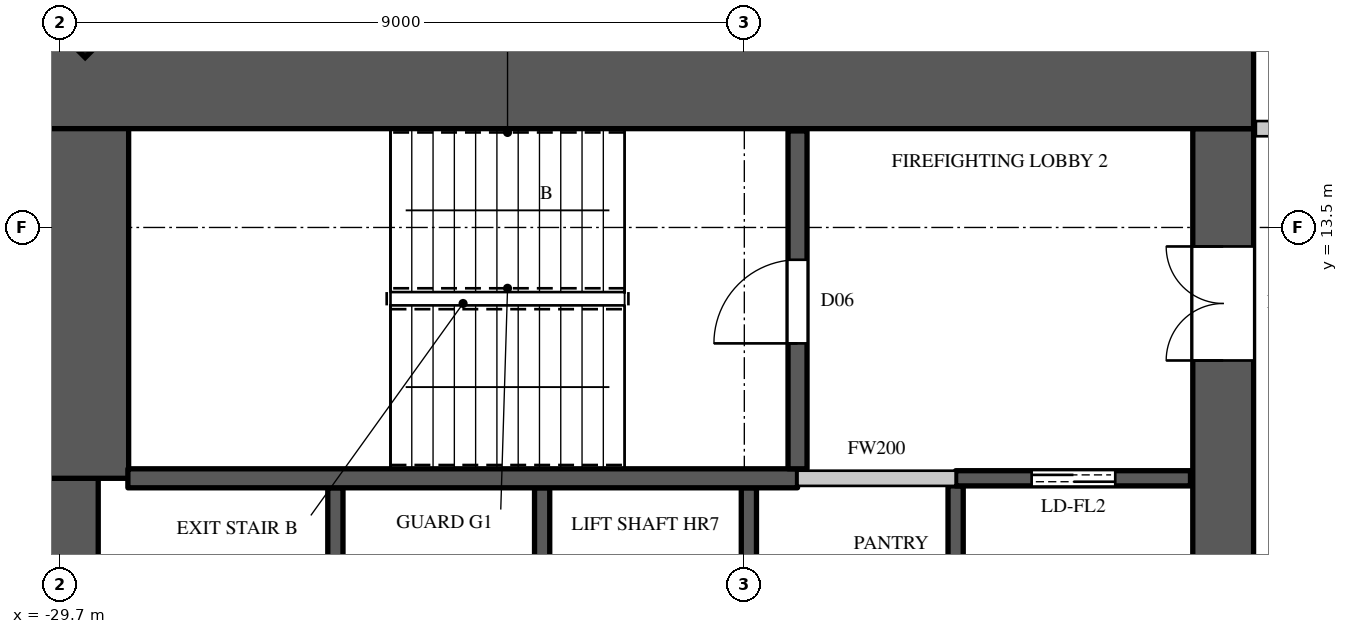
"""IFC4 building model, lengths in metres.
Left out: names, types, materials, properties, quantities, classifications, styles, units other than length and angle.
Written with IfcOpenShell. Run it as: python <this file> out.ifc"""

import sys

from ifc_helpers import new_model, si_unit, direction, frame, frame_2d, origin, origin_2d, place, context, subcontext, project, spatial, rectangle, extrude, element, fill, save


model = new_model("IFC4")
c1 = context("Model", 3, precision=1e-05, world=origin(), true_north=direction((0.0, 1.0)))
c2 = subcontext(c1, "Body", "Model", "MODEL_VIEW")
j1 = project(units=[si_unit("LENGTHUNIT", "METRE"), si_unit("PLANEANGLEUNIT", "RADIAN")], contexts=[c1])
p1 = place(None, origin())
s1 = spatial("IfcSite", under=j1, at=p1, CompositionType="ELEMENT")
p2 = place(p1, origin())
s2 = spatial("IfcBuilding", under=s1, at=p2, CompositionType="ELEMENT")
p3 = place(p2, frame((0.0, 0.0, 205.6)))
s3 = spatial("IfcBuildingStorey", under=s2, at=p3, CompositionType="ELEMENT", Elevation=205.6)
p4 = place(p3, frame((-29.443, 16.443, 0.0), z_axis=(0.0, 0.0, 1.0), x_axis=(-0.707106781187, -0.707106781187, 0.0)))
e1 = element("IfcColumn", 1, at=p4, inside=s3, PredefinedType="COLUMN", context=c2, shape_type="SweptSolid", body=[
    extrude(rectangle(XDim=0.9, YDim=1.1, at=origin_2d()), origin(), (0.0, 0.0, 1.0), 4.1),
])
p5 = place(p3, frame((-30.0, 15.4, 0.0), z_axis=(0.0, 0.0, 1.0), x_axis=(1.0, 0.0, 0.0)))
e2 = element("IfcWall", 2, at=p5, inside=s3, PredefinedType="SHEAR", context=c2, shape_type="SweptSolid", body=[
    extrude(rectangle(XDim=16.0, YDim=1.2, at=frame_2d((8.0, 0.0))), origin(), (0.0, 0.0, 1.0), 4.1),
])
p6 = place(p3, frame((-14.4, -14.8, 0.0), z_axis=(0.0, 0.0, 1.0), x_axis=(0.0, 1.0, 0.0)))
e3 = element("IfcWall", 3, at=p6, inside=s3, PredefinedType="SHEAR", context=c2, shape_type="SweptSolid", body=[
    extrude(rectangle(XDim=29.6, YDim=0.8, at=frame_2d((14.8, 0.0))), origin(), (0.0, 0.0, 1.0), 4.1),
])
p7 = place(p6, frame((1.55, 0.0, 0.0)))
e4 = element("IfcOpeningElement", 4, at=p7, cuts=e3, PredefinedType="OPENING", context=c2, shape_type="SweptSolid", body=[
    extrude(rectangle(XDim=1.5, YDim=2.4, at=frame_2d((0.75, 1.2))), frame((0.0, 0.41, 0.0), z_axis=(0.0, -1.0, 0.0), x_axis=(1.0, 0.0, 0.0)), (0.0, 0.0, 1.0), 0.82),
])
p8 = place(p6, frame((26.55, 0.0, 0.0)))
e5 = element("IfcOpeningElement", 5, at=p8, cuts=e3, PredefinedType="OPENING", context=c2, shape_type="SweptSolid", body=[
    extrude(rectangle(XDim=1.5, YDim=2.4, at=frame_2d((0.75, 1.2))), frame((0.0, 0.41, 0.0), z_axis=(0.0, -1.0, 0.0), x_axis=(1.0, 0.0, 0.0)), (0.0, 0.0, 1.0), 0.82),
])
p9 = place(p6, frame((8.45, 0.0, 0.0)))
e6 = element("IfcOpeningElement", 6, at=p9, cuts=e3, PredefinedType="OPENING", context=c2, shape_type="SweptSolid", body=[
    extrude(rectangle(XDim=1.5, YDim=2.4, at=frame_2d((0.75, 1.2))), frame((0.0, 0.41, 0.0), z_axis=(0.0, -1.0, 0.0), x_axis=(1.0, 0.0, 0.0)), (0.0, 0.0, 1.0), 0.82),
])
p10 = place(p6, frame((19.65, 0.0, 0.0)))
e7 = element("IfcOpeningElement", 7, at=p10, cuts=e3, PredefinedType="OPENING", context=c2, shape_type="SweptSolid", body=[
    extrude(rectangle(XDim=1.5, YDim=2.4, at=frame_2d((0.75, 1.2))), frame((0.0, 0.41, 0.0), z_axis=(0.0, -1.0, 0.0), x_axis=(1.0, 0.0, 0.0)), (0.0, 0.0, 1.0), 0.82),
])
p11 = place(p6, frame((14.5, 0.0, 0.0)))
e8 = element("IfcOpeningElement", 8, at=p11, cuts=e3, PredefinedType="OPENING", context=c2, shape_type="SweptSolid", body=[
    extrude(rectangle(XDim=0.6, YDim=2.0, at=frame_2d((0.3, 1.0))), frame((0.0, 0.41, 0.0), z_axis=(0.0, -1.0, 0.0), x_axis=(1.0, 0.0, 0.0)), (0.0, 0.0, 1.0), 0.82),
])
p12 = place(p3, frame((-29.6, -10.2, 0.0), z_axis=(0.0, 0.0, 1.0), x_axis=(0.0, 1.0, 0.0)))
e9 = element("IfcWall", 9, at=p12, inside=s3, PredefinedType="SHEAR", context=c2, shape_type="SweptSolid", body=[
    extrude(rectangle(XDim=20.4, YDim=0.8, at=frame_2d((10.2, 0.0))), origin(), (0.0, 0.0, 1.0), 4.1),
])
p13 = place(p3, frame((-29.4, 10.2, 0.0), z_axis=(0.0, 0.0, 1.0), x_axis=(0.0, 1.0, 0.0)))
e10 = element("IfcWall", 10, at=p13, inside=s3, PredefinedType="SHEAR", context=c2, shape_type="SweptSolid", body=[
    extrude(rectangle(XDim=4.6, YDim=1.2, at=frame_2d((2.3, 0.0))), origin(), (0.0, 0.0, 1.0), 4.1),
])
p14 = place(p3, frame((-20.0, 10.2, 0.0), z_axis=(0.0, 0.0, 1.0), x_axis=(1.0, 0.0, 0.0)))
e11 = element("IfcWall", 11, at=p14, inside=s3, PredefinedType="PARTITIONING", context=c2, shape_type="SweptSolid", body=[
    extrude(rectangle(XDim=2.08, YDim=0.2, at=frame_2d((1.04, 0.0))), origin(), (0.0, 0.0, 1.0), 3.8),
])
p15 = place(p3, frame((-13.97, 14.8, 0.0), z_axis=(0.0, 0.0, 1.0), x_axis=(1.0, 0.0, 0.0)))
e12 = element("IfcWall", 12, at=p15, inside=s3, PredefinedType="PARTITIONING", context=c2, shape_type="SweptSolid", body=[
    extrude(rectangle(XDim=2.87, YDim=0.2, at=frame_2d((1.435, 0.0))), origin(), (0.0, 0.0, 1.0), 3.8),
])
for number, where, z_axis, x_axis in (
    (13, (-26.08, 7.5, 0.0), (0.0, 0.0, 1.0), (0.0, 1.0, 0.0)),
    (14, (-23.36, 7.5, 0.0), (0.0, 0.0, 1.0), (0.0, 1.0, 0.0)),
):
    element("IfcWall", number, at=place(p3, frame(where, z_axis=z_axis, x_axis=x_axis)), inside=s3, PredefinedType="SHEAR", context=c2, shape_type="SweptSolid", body=[
        extrude(rectangle(XDim=2.575, YDim=0.2, at=frame_2d((1.288, 0.0))), origin(), (0.0, 0.0, 1.0), 4.1),
    ])
p16 = place(p3, frame((-20.64, 7.5, 0.0), z_axis=(0.0, 0.0, 1.0), x_axis=(0.0, 1.0, 0.0)))
e15 = element("IfcWall", 15, at=p16, inside=s3, PredefinedType="SHEAR", context=c2, shape_type="SweptSolid", body=[
    extrude(rectangle(XDim=2.575, YDim=0.2, at=frame_2d((1.288, 0.0))), origin(), (0.0, 0.0, 1.0), 3.8),
])
p17 = place(p3, frame((-17.92, 7.5, 0.0), z_axis=(0.0, 0.0, 1.0), x_axis=(0.0, 1.0, 0.0)))
e16 = element("IfcWall", 16, at=p17, inside=s3, PredefinedType="SHEAR", context=c2, shape_type="SweptSolid", body=[
    extrude(rectangle(XDim=2.6, YDim=0.2, at=frame_2d((1.3, 0.0))), origin(), (0.0, 0.0, 1.0), 3.8),
])
p18 = place(p3, frame((-17.92, 10.2, 0.0), z_axis=(0.0, 0.0, 1.0), x_axis=(1.0, 0.0, 0.0)))
e17 = element("IfcWall", 17, at=p18, inside=s3, PredefinedType="SHEAR", context=c2, shape_type="SweptSolid", body=[
    extrude(rectangle(XDim=3.09, YDim=0.2, at=frame_2d((1.545, 0.0))), origin(), (0.0, 0.0, 1.0), 3.8),
])
p19 = place(p18, frame((1.0, 0.0, 0.0)))
e18 = element("IfcOpeningElement", 18, at=p19, cuts=e17, PredefinedType="OPENING", context=c2, shape_type="SweptSolid", body=[
    extrude(rectangle(XDim=1.1, YDim=2.2, at=frame_2d((0.55, 1.1))), frame((0.0, 0.11, 0.0), z_axis=(0.0, -1.0, 0.0), x_axis=(1.0, 0.0, 0.0)), (0.0, 0.0, 1.0), 0.22),
])
p20 = place(p3, frame((-28.81, 10.2, 0.0), z_axis=(0.0, 0.0, 1.0), x_axis=(1.0, 0.0, 0.0)))
e19 = element("IfcWall", 19, at=p20, inside=s3, PredefinedType="SHEAR", context=c2, shape_type="SweptSolid", body=[
    extrude(rectangle(XDim=8.81, YDim=0.25, at=frame_2d((4.405, 0.0))), origin(), (0.0, 0.0, 1.0), 3.8),
])
p21 = place(p3, frame((-20.0, 10.325, 0.0), z_axis=(0.0, 0.0, 1.0), x_axis=(0.0, 1.0, 0.0)))
e20 = element("IfcWall", 20, at=p21, inside=s3, PredefinedType="SHEAR", context=c2, shape_type="SweptSolid", body=[
    extrude(rectangle(XDim=4.445, YDim=0.25, at=frame_2d((2.223, 0.0))), origin(), (0.0, 0.0, 1.0), 3.8),
])
p22 = place(p21, frame((1.65, 0.0, 0.0)))
e21 = element("IfcOpeningElement", 21, at=p22, cuts=e20, PredefinedType="OPENING", context=c2, shape_type="SweptSolid", body=[
    extrude(rectangle(XDim=1.1, YDim=2.2, at=frame_2d((0.55, 1.1))), frame((0.0, 0.135, 0.0), z_axis=(0.0, -1.0, 0.0), x_axis=(1.0, 0.0, 0.0)), (0.0, 0.0, 1.0), 0.27),
])
p23 = place(p22, origin())
e22 = element("IfcDoor", 22, at=p23, inside=s3, OperationType="SINGLE_SWING_LEFT", PredefinedType="DOOR", context=c2, shape_type="SweptSolid", body=[
    extrude(rectangle(XDim=1.1, YDim=2.2, at=frame_2d((0.55, 1.1))), frame((0.0, 0.025, 0.0), z_axis=(0.0, -1.0, 0.0), x_axis=(1.0, 0.0, 0.0)), (0.0, 0.0, 1.0), 0.05),
])
fill(e21, e22)
p24 = place(p19, origin())
e23 = element("IfcDoor", 23, at=p24, inside=s3, OperationType="DOUBLE_DOOR_SLIDING", PredefinedType="DOOR", context=c2, shape_type="SweptSolid", body=[
    extrude(rectangle(XDim=1.1, YDim=2.2, at=frame_2d((0.55, 1.1))), frame((0.0, 0.025, 0.0), z_axis=(0.0, -1.0, 0.0), x_axis=(1.0, 0.0, 0.0)), (0.0, 0.0, 1.0), 0.05),
])
fill(e18, e23)
p25 = place(p8, origin())
e24 = element("IfcDoor", 24, at=p25, inside=s3, OperationType="DOUBLE_DOOR_SINGLE_SWING", PredefinedType="DOOR", context=c2, shape_type="SweptSolid", body=[
    extrude(rectangle(XDim=1.5, YDim=2.4, at=frame_2d((0.75, 1.2))), frame((0.0, 0.395, 0.0), z_axis=(0.0, -1.0, 0.0), x_axis=(1.0, 0.0, 0.0)), (0.0, 0.0, 1.0), 0.05),
])
fill(e5, e24)
save(model, sys.argv[1])
